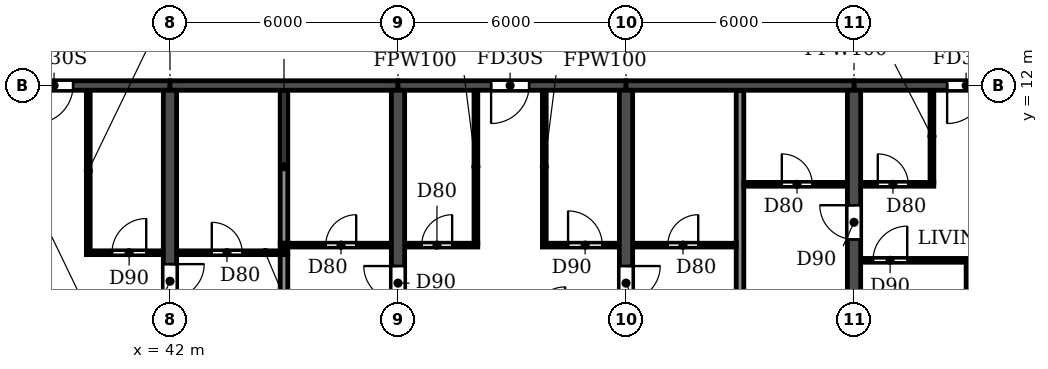
"""IFC4 building model, lengths in metres.
Left out: names, types, materials, properties, quantities, classifications, styles, units other than length and angle.
Written with IfcOpenShell. Run it as: python <this file> out.ifc"""

import sys

from ifc_helpers import new_model, si_unit, direction, frame, frame_2d, origin, place, context, subcontext, project, spatial, rectangle, extrude, element, fill, save


model = new_model("IFC4")
c1 = context("Model", 3, precision=1e-05, world=origin(), true_north=direction((0.0, 1.0)))
c2 = subcontext(c1, "Body", "Model", "MODEL_VIEW")
j1 = project(units=[si_unit("LENGTHUNIT", "METRE"), si_unit("PLANEANGLEUNIT", "RADIAN")], contexts=[c1])
p1 = place(None, origin())
s1 = spatial("IfcSite", under=j1, at=p1, CompositionType="ELEMENT")
p2 = place(p1, origin())
s2 = spatial("IfcBuilding", under=s1, at=p2, CompositionType="ELEMENT")
p3 = place(p2, frame((0.0, 0.0, 92.7)))
s3 = spatial("IfcBuildingStorey", under=s2, at=p3, CompositionType="ELEMENT", Elevation=92.7)
p4 = place(p3, frame((42.0, 0.2, 0.0), z_axis=(0.0, 0.0, 1.0), x_axis=(0.0, 1.0, 0.0)))
e1 = element("IfcWall", 1, at=p4, inside=s3, PredefinedType="SHEAR", context=c2, shape_type="SweptSolid", body=[
    extrude(rectangle(XDim=11.675, YDim=0.35, at=frame_2d((5.837, 0.0))), origin(), (0.0, 0.0, 1.0), 3.06),
])
p5 = place(p4, frame((6.2, 0.0, 0.0)))
e2 = element("IfcOpeningElement", 2, at=p5, cuts=e1, PredefinedType="OPENING", context=c2, shape_type="SweptSolid", body=[
    extrude(rectangle(XDim=0.9, YDim=2.1, at=frame_2d((0.45, 1.05))), frame((0.0, 0.185, 0.0), z_axis=(0.0, -1.0, 0.0), x_axis=(1.0, 0.0, 0.0)), (0.0, 0.0, 1.0), 0.37),
])
p6 = place(p3, frame((48.0, 0.2, 0.0), z_axis=(0.0, 0.0, 1.0), x_axis=(0.0, 1.0, 0.0)))
e3 = element("IfcWall", 3, at=p6, inside=s3, PredefinedType="SHEAR", context=c2, shape_type="SweptSolid", body=[
    extrude(rectangle(XDim=11.675, YDim=0.35, at=frame_2d((5.837, 0.0))), origin(), (0.0, 0.0, 1.0), 3.06),
])
p7 = place(p6, frame((6.15, 0.0, 0.0)))
e4 = element("IfcOpeningElement", 4, at=p7, cuts=e3, PredefinedType="OPENING", context=c2, shape_type="SweptSolid", body=[
    extrude(rectangle(XDim=0.9, YDim=2.1, at=frame_2d((0.45, 1.05))), frame((0.0, 0.185, 0.0), z_axis=(0.0, -1.0, 0.0), x_axis=(1.0, 0.0, 0.0)), (0.0, 0.0, 1.0), 0.37),
])
p8 = place(p3, frame((54.0, 0.2, 0.0), z_axis=(0.0, 0.0, 1.0), x_axis=(0.0, 1.0, 0.0)))
e5 = element("IfcWall", 5, at=p8, inside=s3, PredefinedType="SHEAR", context=c2, shape_type="SweptSolid", body=[
    extrude(rectangle(XDim=11.675, YDim=0.35, at=frame_2d((5.837, 0.0))), origin(), (0.0, 0.0, 1.0), 3.06),
])
p9 = place(p8, frame((6.15, 0.0, 0.0)))
e6 = element("IfcOpeningElement", 6, at=p9, cuts=e5, PredefinedType="OPENING", context=c2, shape_type="SweptSolid", body=[
    extrude(rectangle(XDim=0.9, YDim=2.1, at=frame_2d((0.45, 1.05))), frame((0.0, 0.185, 0.0), z_axis=(0.0, -1.0, 0.0), x_axis=(1.0, 0.0, 0.0)), (0.0, 0.0, 1.0), 0.37),
])
p10 = place(p3, frame((60.0, 0.2, 0.0), z_axis=(0.0, 0.0, 1.0), x_axis=(0.0, 1.0, 0.0)))
e7 = element("IfcWall", 7, at=p10, inside=s3, PredefinedType="SHEAR", context=c2, shape_type="SweptSolid", body=[
    extrude(rectangle(XDim=11.675, YDim=0.35, at=frame_2d((5.837, 0.0))), origin(), (0.0, 0.0, 1.0), 3.06),
])
p11 = place(p10, frame((7.75, 0.0, 0.0)))
e8 = element("IfcOpeningElement", 8, at=p11, cuts=e7, PredefinedType="OPENING", context=c2, shape_type="SweptSolid", body=[
    extrude(rectangle(XDim=0.9, YDim=2.1, at=frame_2d((0.45, 1.05))), frame((0.0, 0.185, 0.0), z_axis=(0.0, -1.0, 0.0), x_axis=(1.0, 0.0, 0.0)), (0.0, 0.0, 1.0), 0.37),
])
p12 = place(p3, frame((36.0, 12.0, 0.0), z_axis=(0.0, 0.0, 1.0), x_axis=(1.0, 0.0, 0.0)))
e9 = element("IfcWall", 9, at=p12, inside=s3, PredefinedType="SHEAR", context=c2, shape_type="SweptSolid", body=[
    extrude(rectangle(XDim=6.0, YDim=0.25, at=frame_2d((3.0, 0.0))), origin(), (0.0, 0.0, 1.0), 2.46),
])
p13 = place(p12, frame((2.45, 0.0, 0.0)))
e10 = element("IfcOpeningElement", 10, at=p13, cuts=e9, PredefinedType="OPENING", context=c2, shape_type="SweptSolid", body=[
    extrude(rectangle(XDim=1.0, YDim=2.1, at=frame_2d((0.5, 1.05))), frame((0.0, 0.135, 0.0), z_axis=(0.0, -1.0, 0.0), x_axis=(1.0, 0.0, 0.0)), (0.0, 0.0, 1.0), 0.27),
])
p14 = place(p3, frame((42.0, 12.0, 0.0), z_axis=(0.0, 0.0, 1.0), x_axis=(1.0, 0.0, 0.0)))
e11 = element("IfcWall", 11, at=p14, inside=s3, PredefinedType="SHEAR", context=c2, shape_type="SweptSolid", body=[
    extrude(rectangle(XDim=6.0, YDim=0.25, at=frame_2d((3.0, 0.0))), origin(), (0.0, 0.0, 1.0), 2.46),
])
p15 = place(p3, frame((48.0, 12.0, 0.0), z_axis=(0.0, 0.0, 1.0), x_axis=(1.0, 0.0, 0.0)))
e12 = element("IfcWall", 12, at=p15, inside=s3, PredefinedType="SHEAR", context=c2, shape_type="SweptSolid", body=[
    extrude(rectangle(XDim=6.0, YDim=0.25, at=frame_2d((3.0, 0.0))), origin(), (0.0, 0.0, 1.0), 2.46),
])
p16 = place(p15, frame((2.45, 0.0, 0.0)))
e13 = element("IfcOpeningElement", 13, at=p16, cuts=e12, PredefinedType="OPENING", context=c2, shape_type="SweptSolid", body=[
    extrude(rectangle(XDim=1.0, YDim=2.1, at=frame_2d((0.5, 1.05))), frame((0.0, 0.135, 0.0), z_axis=(0.0, -1.0, 0.0), x_axis=(1.0, 0.0, 0.0)), (0.0, 0.0, 1.0), 0.27),
])
p17 = place(p3, frame((54.0, 12.0, 0.0), z_axis=(0.0, 0.0, 1.0), x_axis=(1.0, 0.0, 0.0)))
e14 = element("IfcWall", 14, at=p17, inside=s3, PredefinedType="SHEAR", context=c2, shape_type="SweptSolid", body=[
    extrude(rectangle(XDim=6.0, YDim=0.25, at=frame_2d((3.0, 0.0))), origin(), (0.0, 0.0, 1.0), 2.46),
])
p18 = place(p3, frame((60.0, 12.0, 0.0), z_axis=(0.0, 0.0, 1.0), x_axis=(1.0, 0.0, 0.0)))
e15 = element("IfcWall", 15, at=p18, inside=s3, PredefinedType="SHEAR", context=c2, shape_type="SweptSolid", body=[
    extrude(rectangle(XDim=6.0, YDim=0.25, at=frame_2d((3.0, 0.0))), origin(), (0.0, 0.0, 1.0), 2.46),
])
p19 = place(p18, frame((2.45, 0.0, 0.0)))
e16 = element("IfcOpeningElement", 16, at=p19, cuts=e15, PredefinedType="OPENING", context=c2, shape_type="SweptSolid", body=[
    extrude(rectangle(XDim=1.0, YDim=2.1, at=frame_2d((0.5, 1.05))), frame((0.0, 0.135, 0.0), z_axis=(0.0, -1.0, 0.0), x_axis=(1.0, 0.0, 0.0)), (0.0, 0.0, 1.0), 0.27),
])
p20 = place(p3, frame((45.0, 0.06, 0.0), z_axis=(0.0, 0.0, 1.0), x_axis=(0.0, 1.0, 0.0)))
e17 = element("IfcWall", 17, at=p20, inside=s3, PredefinedType="PARTITIONING", context=c2, shape_type="SweptSolid", body=[
    extrude(rectangle(XDim=7.49, YDim=0.2, at=frame_2d((3.745, 0.0))), origin(), (0.0, 0.0, 1.0), 3.06),
])
p21 = place(p3, frame((45.0, 7.85, 0.0), z_axis=(0.0, 0.0, 1.0), x_axis=(0.0, 1.0, 0.0)))
e18 = element("IfcWall", 18, at=p21, inside=s3, PredefinedType="PARTITIONING", context=c2, shape_type="SweptSolid", body=[
    extrude(rectangle(XDim=4.015, YDim=0.2, at=frame_2d((2.007, 0.0))), origin(), (0.0, 0.0, 1.0), 3.06),
])
p22 = place(p3, frame((57.0, 0.06, 0.0), z_axis=(0.0, 0.0, 1.0), x_axis=(0.0, 1.0, 0.0)))
e19 = element("IfcWall", 19, at=p22, inside=s3, PredefinedType="PARTITIONING", context=c2, shape_type="SweptSolid", body=[
    extrude(rectangle(XDim=11.805, YDim=0.2, at=frame_2d((5.902, 0.0))), origin(), (0.0, 0.0, 1.0), 3.06),
])
p23 = place(p3, frame((60.185, 7.4, 0.0), z_axis=(0.0, 0.0, 1.0), x_axis=(1.0, 0.0, 0.0)))
e20 = element("IfcWall", 20, at=p23, inside=s3, PredefinedType="PARTITIONING", context=c2, shape_type="SweptSolid", body=[
    extrude(rectangle(XDim=2.865, YDim=0.1, at=frame_2d((1.433, 0.0))), origin(), (0.0, 0.0, 1.0), 3.06),
])
p24 = place(p23, frame((0.315, 0.0, 0.0)))
e21 = element("IfcOpeningElement", 21, at=p24, cuts=e20, PredefinedType="OPENING", context=c2, shape_type="SweptSolid", body=[
    extrude(rectangle(XDim=0.9, YDim=2.1, at=frame_2d((0.45, 1.05))), frame((0.0, 0.06, 0.0), z_axis=(0.0, -1.0, 0.0), x_axis=(1.0, 0.0, 0.0)), (0.0, 0.0, 1.0), 0.12),
])
p25 = place(p3, frame((39.8, 7.6, 0.0), z_axis=(0.0, 0.0, 1.0), x_axis=(1.0, 0.0, 0.0)))
e22 = element("IfcWall", 22, at=p25, inside=s3, PredefinedType="PARTITIONING", context=c2, shape_type="SweptSolid", body=[
    extrude(rectangle(XDim=2.015, YDim=0.1, at=frame_2d((1.007, 0.0))), origin(), (0.0, 0.0, 1.0), 3.06),
])
p26 = place(p25, frame((0.675, 0.0, 0.0)))
e23 = element("IfcOpeningElement", 23, at=p26, cuts=e22, PredefinedType="OPENING", context=c2, shape_type="SweptSolid", body=[
    extrude(rectangle(XDim=0.9, YDim=2.1, at=frame_2d((0.45, 1.05))), frame((0.0, 0.06, 0.0), z_axis=(0.0, -1.0, 0.0), x_axis=(1.0, 0.0, 0.0)), (0.0, 0.0, 1.0), 0.12),
])
p27 = place(p3, frame((42.185, 7.6, 0.0), z_axis=(0.0, 0.0, 1.0), x_axis=(1.0, 0.0, 0.0)))
e24 = element("IfcWall", 24, at=p27, inside=s3, PredefinedType="PARTITIONING", context=c2, shape_type="SweptSolid", body=[
    extrude(rectangle(XDim=2.915, YDim=0.1, at=frame_2d((1.458, 0.0))), origin(), (0.0, 0.0, 1.0), 3.06),
])
p28 = place(p27, frame((0.915, 0.0, 0.0)))
e25 = element("IfcOpeningElement", 25, at=p28, cuts=e24, PredefinedType="OPENING", context=c2, shape_type="SweptSolid", body=[
    extrude(rectangle(XDim=0.8, YDim=2.1, at=frame_2d((0.4, 1.05))), frame((0.0, 0.06, 0.0), z_axis=(0.0, -1.0, 0.0), x_axis=(1.0, 0.0, 0.0)), (0.0, 0.0, 1.0), 0.12),
])
p29 = place(p3, frame((44.9, 7.8, 0.0), z_axis=(0.0, 0.0, 1.0), x_axis=(1.0, 0.0, 0.0)))
e26 = element("IfcWall", 26, at=p29, inside=s3, PredefinedType="PARTITIONING", context=c2, shape_type="SweptSolid", body=[
    extrude(rectangle(XDim=2.915, YDim=0.1, at=frame_2d((1.458, 0.0))), origin(), (0.0, 0.0, 1.0), 3.06),
])
p30 = place(p29, frame((1.2, 0.0, 0.0)))
e27 = element("IfcOpeningElement", 27, at=p30, cuts=e26, PredefinedType="OPENING", context=c2, shape_type="SweptSolid", body=[
    extrude(rectangle(XDim=0.8, YDim=2.1, at=frame_2d((0.4, 1.05))), frame((0.0, 0.06, 0.0), z_axis=(0.0, -1.0, 0.0), x_axis=(1.0, 0.0, 0.0)), (0.0, 0.0, 1.0), 0.12),
])
p31 = place(p3, frame((48.185, 7.8, 0.0), z_axis=(0.0, 0.0, 1.0), x_axis=(1.0, 0.0, 0.0)))
e28 = element("IfcWall", 28, at=p31, inside=s3, PredefinedType="PARTITIONING", context=c2, shape_type="SweptSolid", body=[
    extrude(rectangle(XDim=1.915, YDim=0.1, at=frame_2d((0.958, 0.0))), origin(), (0.0, 0.0, 1.0), 3.06),
])
p32 = place(p31, frame((0.44, 0.0, 0.0)))
e29 = element("IfcOpeningElement", 29, at=p32, cuts=e28, PredefinedType="OPENING", context=c2, shape_type="SweptSolid", body=[
    extrude(rectangle(XDim=0.8, YDim=2.1, at=frame_2d((0.4, 1.05))), frame((0.0, 0.06, 0.0), z_axis=(0.0, -1.0, 0.0), x_axis=(1.0, 0.0, 0.0)), (0.0, 0.0, 1.0), 0.12),
])
p33 = place(p3, frame((51.8, 7.8, 0.0), z_axis=(0.0, 0.0, 1.0), x_axis=(1.0, 0.0, 0.0)))
e30 = element("IfcWall", 30, at=p33, inside=s3, PredefinedType="PARTITIONING", context=c2, shape_type="SweptSolid", body=[
    extrude(rectangle(XDim=2.015, YDim=0.1, at=frame_2d((1.007, 0.0))), origin(), (0.0, 0.0, 1.0), 3.06),
])
p34 = place(p33, frame((0.675, 0.0, 0.0)))
e31 = element("IfcOpeningElement", 31, at=p34, cuts=e30, PredefinedType="OPENING", context=c2, shape_type="SweptSolid", body=[
    extrude(rectangle(XDim=0.9, YDim=2.1, at=frame_2d((0.45, 1.05))), frame((0.0, 0.06, 0.0), z_axis=(0.0, -1.0, 0.0), x_axis=(1.0, 0.0, 0.0)), (0.0, 0.0, 1.0), 0.12),
])
p35 = place(p3, frame((54.185, 7.8, 0.0), z_axis=(0.0, 0.0, 1.0), x_axis=(1.0, 0.0, 0.0)))
e32 = element("IfcWall", 32, at=p35, inside=s3, PredefinedType="PARTITIONING", context=c2, shape_type="SweptSolid", body=[
    extrude(rectangle(XDim=2.715, YDim=0.1, at=frame_2d((1.357, 0.0))), origin(), (0.0, 0.0, 1.0), 3.06),
])
p36 = place(p35, frame((0.915, 0.0, 0.0)))
e33 = element("IfcOpeningElement", 33, at=p36, cuts=e32, PredefinedType="OPENING", context=c2, shape_type="SweptSolid", body=[
    extrude(rectangle(XDim=0.8, YDim=2.1, at=frame_2d((0.4, 1.05))), frame((0.0, 0.06, 0.0), z_axis=(0.0, -1.0, 0.0), x_axis=(1.0, 0.0, 0.0)), (0.0, 0.0, 1.0), 0.12),
])
p37 = place(p3, frame((57.1, 9.4, 0.0), z_axis=(0.0, 0.0, 1.0), x_axis=(1.0, 0.0, 0.0)))
e34 = element("IfcWall", 34, at=p37, inside=s3, PredefinedType="PARTITIONING", context=c2, shape_type="SweptSolid", body=[
    extrude(rectangle(XDim=2.715, YDim=0.1, at=frame_2d((1.357, 0.0))), origin(), (0.0, 0.0, 1.0), 3.06),
])
p38 = place(p37, frame((1.0, 0.0, 0.0)))
e35 = element("IfcOpeningElement", 35, at=p38, cuts=e34, PredefinedType="OPENING", context=c2, shape_type="SweptSolid", body=[
    extrude(rectangle(XDim=0.8, YDim=2.1, at=frame_2d((0.4, 1.05))), frame((0.0, 0.06, 0.0), z_axis=(0.0, -1.0, 0.0), x_axis=(1.0, 0.0, 0.0)), (0.0, 0.0, 1.0), 0.12),
])
p39 = place(p3, frame((60.185, 9.4, 0.0), z_axis=(0.0, 0.0, 1.0), x_axis=(1.0, 0.0, 0.0)))
e36 = element("IfcWall", 36, at=p39, inside=s3, PredefinedType="PARTITIONING", context=c2, shape_type="SweptSolid", body=[
    extrude(rectangle(XDim=1.915, YDim=0.1, at=frame_2d((0.958, 0.0))), origin(), (0.0, 0.0, 1.0), 3.06),
])
p40 = place(p39, frame((0.44, 0.0, 0.0)))
e37 = element("IfcOpeningElement", 37, at=p40, cuts=e36, PredefinedType="OPENING", context=c2, shape_type="SweptSolid", body=[
    extrude(rectangle(XDim=0.8, YDim=2.1, at=frame_2d((0.4, 1.05))), frame((0.0, 0.06, 0.0), z_axis=(0.0, -1.0, 0.0), x_axis=(1.0, 0.0, 0.0)), (0.0, 0.0, 1.0), 0.12),
])
p41 = place(p3, frame((39.85, 7.65, 0.0), z_axis=(0.0, 0.0, 1.0), x_axis=(0.0, 1.0, 0.0)))
e38 = element("IfcWall", 38, at=p41, inside=s3, PredefinedType="PARTITIONING", context=c2, shape_type="SweptSolid", body=[
    extrude(rectangle(XDim=4.215, YDim=0.1, at=frame_2d((2.107, 0.0))), origin(), (0.0, 0.0, 1.0), 3.06),
])
for number, where, z_axis, x_axis in (
    (39, (50.05, 7.85, 0.0), (0.0, 0.0, 1.0), (0.0, 1.0, 0.0)),
    (40, (51.85, 7.85, 0.0), (0.0, 0.0, 1.0), (0.0, 1.0, 0.0)),
):
    element("IfcWall", number, at=place(p3, frame(where, z_axis=z_axis, x_axis=x_axis)), inside=s3, PredefinedType="PARTITIONING", context=c2, shape_type="SweptSolid", body=[
        extrude(rectangle(XDim=4.015, YDim=0.1, at=frame_2d((2.007, 0.0))), origin(), (0.0, 0.0, 1.0), 3.06),
    ])
p42 = place(p3, frame((62.05, 9.45, 0.0), z_axis=(0.0, 0.0, 1.0), x_axis=(0.0, 1.0, 0.0)))
e41 = element("IfcWall", 41, at=p42, inside=s3, PredefinedType="PARTITIONING", context=c2, shape_type="SweptSolid", body=[
    extrude(rectangle(XDim=2.415, YDim=0.1, at=frame_2d((1.208, 0.0))), origin(), (0.0, 0.0, 1.0), 3.06),
])
p43 = place(p3, frame((63.0, 0.06, 0.0), z_axis=(0.0, 0.0, 1.0), x_axis=(0.0, 1.0, 0.0)))
e42 = element("IfcWall", 42, at=p43, inside=s3, PredefinedType="PARTITIONING", context=c2, shape_type="SweptSolid", body=[
    extrude(rectangle(XDim=7.29, YDim=0.1, at=frame_2d((3.645, 0.0))), origin(), (0.0, 0.0, 1.0), 3.06),
])
p44 = place(p28, origin())
e43 = element("IfcDoor", 43, at=p44, inside=s3, OperationType="SINGLE_SWING_LEFT", PredefinedType="DOOR", context=c2, shape_type="SweptSolid", body=[
    extrude(rectangle(XDim=0.8, YDim=2.1, at=frame_2d((0.4, 1.05))), frame((0.0, 0.025, 0.0), z_axis=(0.0, -1.0, 0.0), x_axis=(1.0, 0.0, 0.0)), (0.0, 0.0, 1.0), 0.05),
])
fill(e25, e43)
p45 = place(p13, frame((1.0, 0.0, 0.0), z_axis=(0.0, 0.0, 1.0), x_axis=(-1.0, 0.0, 0.0)))
e44 = element("IfcDoor", 44, at=p45, inside=s3, OperationType="SINGLE_SWING_RIGHT", PredefinedType="DOOR", context=c2, shape_type="SweptSolid", body=[
    extrude(rectangle(XDim=1.0, YDim=2.1, at=frame_2d((0.5, 1.05))), frame((0.0, 0.025, 0.0), z_axis=(0.0, -1.0, 0.0), x_axis=(1.0, 0.0, 0.0)), (0.0, 0.0, 1.0), 0.05),
])
fill(e10, e44)
p46 = place(p26, origin())
e45 = element("IfcDoor", 45, at=p46, inside=s3, OperationType="SINGLE_SWING_RIGHT", PredefinedType="DOOR", context=c2, shape_type="SweptSolid", body=[
    extrude(rectangle(XDim=0.9, YDim=2.1, at=frame_2d((0.45, 1.05))), frame((0.0, 0.025, 0.0), z_axis=(0.0, -1.0, 0.0), x_axis=(1.0, 0.0, 0.0)), (0.0, 0.0, 1.0), 0.05),
])
fill(e23, e45)
p47 = place(p5, frame((0.9, 0.0, 0.0), z_axis=(0.0, 0.0, 1.0), x_axis=(-1.0, 0.0, 0.0)))
e46 = element("IfcDoor", 46, at=p47, inside=s3, OperationType="SINGLE_SWING_LEFT", PredefinedType="DOOR", context=c2, shape_type="SweptSolid", body=[
    extrude(rectangle(XDim=0.9, YDim=2.1, at=frame_2d((0.45, 1.05))), frame((0.0, 0.025, 0.0), z_axis=(0.0, -1.0, 0.0), x_axis=(1.0, 0.0, 0.0)), (0.0, 0.0, 1.0), 0.05),
])
fill(e2, e46)
p48 = place(p30, origin())
e47 = element("IfcDoor", 47, at=p48, inside=s3, OperationType="SINGLE_SWING_RIGHT", PredefinedType="DOOR", context=c2, shape_type="SweptSolid", body=[
    extrude(rectangle(XDim=0.8, YDim=2.1, at=frame_2d((0.4, 1.05))), frame((0.0, 0.025, 0.0), z_axis=(0.0, -1.0, 0.0), x_axis=(1.0, 0.0, 0.0)), (0.0, 0.0, 1.0), 0.05),
])
fill(e27, e47)
p49 = place(p36, origin())
e48 = element("IfcDoor", 48, at=p49, inside=s3, OperationType="SINGLE_SWING_RIGHT", PredefinedType="DOOR", context=c2, shape_type="SweptSolid", body=[
    extrude(rectangle(XDim=0.8, YDim=2.1, at=frame_2d((0.4, 1.05))), frame((0.0, 0.025, 0.0), z_axis=(0.0, -1.0, 0.0), x_axis=(1.0, 0.0, 0.0)), (0.0, 0.0, 1.0), 0.05),
])
fill(e33, e48)
p50 = place(p7, origin())
e49 = element("IfcDoor", 49, at=p50, inside=s3, OperationType="SINGLE_SWING_RIGHT", PredefinedType="DOOR", context=c2, shape_type="SweptSolid", body=[
    extrude(rectangle(XDim=0.9, YDim=2.1, at=frame_2d((0.45, 1.05))), frame((0.0, 0.025, 0.0), z_axis=(0.0, -1.0, 0.0), x_axis=(1.0, 0.0, 0.0)), (0.0, 0.0, 1.0), 0.05),
])
fill(e4, e49)
p51 = place(p32, origin())
e50 = element("IfcDoor", 50, at=p51, inside=s3, OperationType="SINGLE_SWING_RIGHT", PredefinedType="DOOR", context=c2, shape_type="SweptSolid", body=[
    extrude(rectangle(XDim=0.8, YDim=2.1, at=frame_2d((0.4, 1.05))), frame((0.0, 0.025, 0.0), z_axis=(0.0, -1.0, 0.0), x_axis=(1.0, 0.0, 0.0)), (0.0, 0.0, 1.0), 0.05),
])
fill(e29, e50)
p52 = place(p16, frame((1.0, 0.0, 0.0), z_axis=(0.0, 0.0, 1.0), x_axis=(-1.0, 0.0, 0.0)))
e51 = element("IfcDoor", 51, at=p52, inside=s3, OperationType="SINGLE_SWING_RIGHT", PredefinedType="DOOR", context=c2, shape_type="SweptSolid", body=[
    extrude(rectangle(XDim=1.0, YDim=2.1, at=frame_2d((0.5, 1.05))), frame((0.0, 0.025, 0.0), z_axis=(0.0, -1.0, 0.0), x_axis=(1.0, 0.0, 0.0)), (0.0, 0.0, 1.0), 0.05),
])
fill(e13, e51)
p53 = place(p34, origin())
e52 = element("IfcDoor", 52, at=p53, inside=s3, OperationType="SINGLE_SWING_LEFT", PredefinedType="DOOR", context=c2, shape_type="SweptSolid", body=[
    extrude(rectangle(XDim=0.9, YDim=2.1, at=frame_2d((0.45, 1.05))), frame((0.0, 0.025, 0.0), z_axis=(0.0, -1.0, 0.0), x_axis=(1.0, 0.0, 0.0)), (0.0, 0.0, 1.0), 0.05),
])
fill(e31, e52)
p54 = place(p9, frame((0.9, 0.0, 0.0), z_axis=(0.0, 0.0, 1.0), x_axis=(-1.0, 0.0, 0.0)))
e53 = element("IfcDoor", 53, at=p54, inside=s3, OperationType="SINGLE_SWING_LEFT", PredefinedType="DOOR", context=c2, shape_type="SweptSolid", body=[
    extrude(rectangle(XDim=0.9, YDim=2.1, at=frame_2d((0.45, 1.05))), frame((0.0, 0.025, 0.0), z_axis=(0.0, -1.0, 0.0), x_axis=(1.0, 0.0, 0.0)), (0.0, 0.0, 1.0), 0.05),
])
fill(e6, e53)
p55 = place(p38, origin())
e54 = element("IfcDoor", 54, at=p55, inside=s3, OperationType="SINGLE_SWING_LEFT", PredefinedType="DOOR", context=c2, shape_type="SweptSolid", body=[
    extrude(rectangle(XDim=0.8, YDim=2.1, at=frame_2d((0.4, 1.05))), frame((0.0, 0.025, 0.0), z_axis=(0.0, -1.0, 0.0), x_axis=(1.0, 0.0, 0.0)), (0.0, 0.0, 1.0), 0.05),
])
fill(e35, e54)
p56 = place(p11, origin())
e55 = element("IfcDoor", 55, at=p56, inside=s3, OperationType="SINGLE_SWING_RIGHT", PredefinedType="DOOR", context=c2, shape_type="SweptSolid", body=[
    extrude(rectangle(XDim=0.9, YDim=2.1, at=frame_2d((0.45, 1.05))), frame((0.0, 0.025, 0.0), z_axis=(0.0, -1.0, 0.0), x_axis=(1.0, 0.0, 0.0)), (0.0, 0.0, 1.0), 0.05),
])
fill(e8, e55)
p57 = place(p24, origin())
e56 = element("IfcDoor", 56, at=p57, inside=s3, OperationType="SINGLE_SWING_RIGHT", PredefinedType="DOOR", context=c2, shape_type="SweptSolid", body=[
    extrude(rectangle(XDim=0.9, YDim=2.1, at=frame_2d((0.45, 1.05))), frame((0.0, 0.025, 0.0), z_axis=(0.0, -1.0, 0.0), x_axis=(1.0, 0.0, 0.0)), (0.0, 0.0, 1.0), 0.05),
])
fill(e21, e56)
p58 = place(p40, origin())
e57 = element("IfcDoor", 57, at=p58, inside=s3, OperationType="SINGLE_SWING_LEFT", PredefinedType="DOOR", context=c2, shape_type="SweptSolid", body=[
    extrude(rectangle(XDim=0.8, YDim=2.1, at=frame_2d((0.4, 1.05))), frame((0.0, 0.025, 0.0), z_axis=(0.0, -1.0, 0.0), x_axis=(1.0, 0.0, 0.0)), (0.0, 0.0, 1.0), 0.05),
])
fill(e37, e57)
p59 = place(p19, frame((1.0, 0.0, 0.0), z_axis=(0.0, 0.0, 1.0), x_axis=(-1.0, 0.0, 0.0)))
e58 = element("IfcDoor", 58, at=p59, inside=s3, OperationType="SINGLE_SWING_RIGHT", PredefinedType="DOOR", context=c2, shape_type="SweptSolid", body=[
    extrude(rectangle(XDim=1.0, YDim=2.1, at=frame_2d((0.5, 1.05))), frame((0.0, 0.025, 0.0), z_axis=(0.0, -1.0, 0.0), x_axis=(1.0, 0.0, 0.0)), (0.0, 0.0, 1.0), 0.05),
])
fill(e16, e58)
save(model, sys.argv[1])
